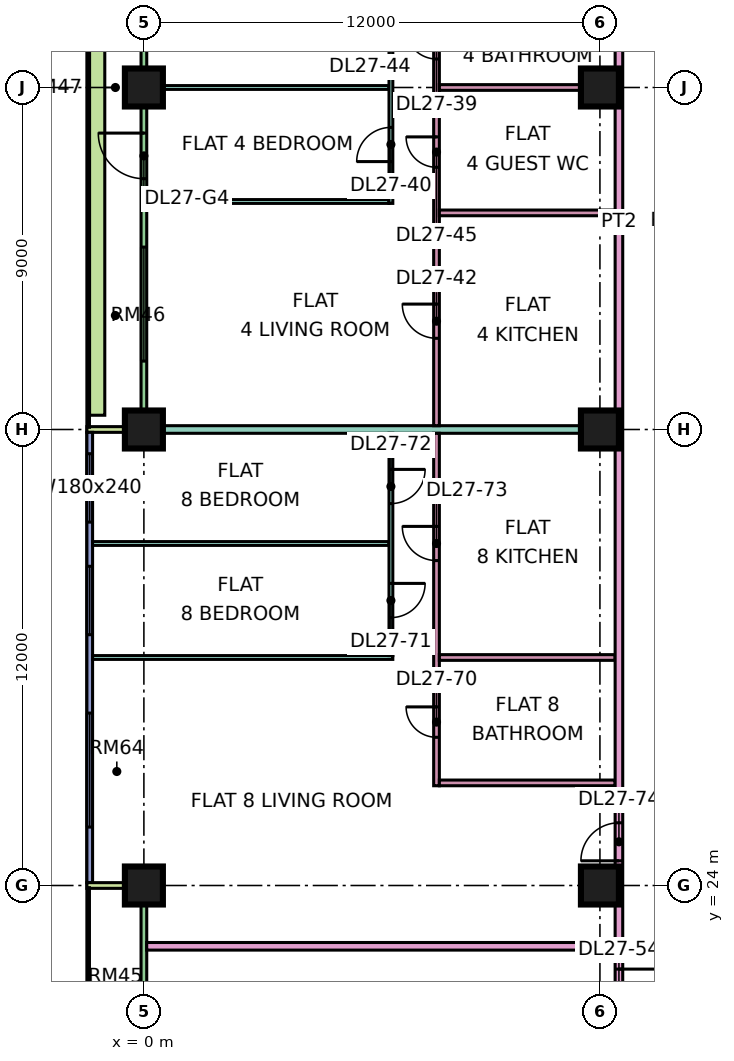
"""IFC4 building model, lengths in metres.
Left out: names, types, materials, properties, quantities, classifications, styles, units other than length and angle.
Written with IfcOpenShell. Run it as: python <this file> out.ifc"""

import sys

from ifc_helpers import new_model, si_unit, direction, frame, frame_2d, origin, origin_2d, place, context, subcontext, project, spatial, rectangle, extrude, element, fill, save


model = new_model("IFC4")
c1 = context("Model", 3, precision=1e-05, world=origin(), true_north=direction((0.0, 1.0)))
c2 = subcontext(c1, "Body", "Model", "MODEL_VIEW")
j1 = project(units=[si_unit("LENGTHUNIT", "METRE"), si_unit("PLANEANGLEUNIT", "RADIAN")], contexts=[c1])
p1 = place(None, origin())
s1 = spatial("IfcSite", under=j1, at=p1, CompositionType="ELEMENT")
p2 = place(p1, origin())
s2 = spatial("IfcBuilding", under=s1, at=p2, CompositionType="ELEMENT")
p3 = place(p2, frame((0.0, 0.0, 118.15)))
s3 = spatial("IfcBuildingStorey", under=s2, at=p3, CompositionType="ELEMENT", Elevation=118.15)
p4 = place(p3, frame((0.0, 24.0, 0.0), z_axis=(0.0, 0.0, 1.0), x_axis=(1.0, 0.0, 0.0)))
e1 = element("IfcColumn", 1, at=p4, inside=s3, PredefinedType="COLUMN", context=c2, shape_type="SweptSolid", body=[
    extrude(rectangle(XDim=1.0, YDim=1.0, at=origin_2d()), origin(), (0.0, 0.0, 1.0), 3.75),
])
p5 = place(p3, frame((0.0, 36.0, 0.0), z_axis=(0.0, 0.0, 1.0), x_axis=(1.0, 0.0, 0.0)))
e2 = element("IfcColumn", 2, at=p5, inside=s3, PredefinedType="COLUMN", context=c2, shape_type="SweptSolid", body=[
    extrude(rectangle(XDim=1.0, YDim=1.0, at=origin_2d()), origin(), (0.0, 0.0, 1.0), 3.75),
])
for number, where, z_axis, x_axis in (
    (3, (0.0, 45.0, 0.0), (0.0, 0.0, 1.0), (1.0, 0.0, 0.0)),
    (4, (12.0, 24.0, 0.0), (0.0, 0.0, 1.0), (1.0, 0.0, 0.0)),
    (5, (12.0, 36.0, 0.0), (0.0, 0.0, 1.0), (1.0, 0.0, 0.0)),
    (6, (12.0, 45.0, 0.0), (0.0, 0.0, 1.0), (1.0, 0.0, 0.0)),
):
    element("IfcColumn", number, at=place(p3, frame(where, z_axis=z_axis, x_axis=x_axis)), inside=s3, PredefinedType="COLUMN", context=c2, shape_type="SweptSolid", body=[
        extrude(rectangle(XDim=1.0, YDim=1.0, at=origin_2d()), origin(), (0.0, 0.0, 1.0), 3.75),
    ])
p6 = place(p3, frame((0.0, 47.925, 0.0), z_axis=(0.0, 0.0, 1.0), x_axis=(0.0, -1.0, 0.0)))
e7 = element("IfcWall", 7, at=p6, inside=s3, PredefinedType="SOLIDWALL", context=c2, shape_type="SweptSolid", body=[
    extrude(rectangle(XDim=11.85, YDim=0.15, at=frame_2d((5.925, 0.0))), origin(), (0.0, 0.0, 1.0), 3.35),
])
p7 = place(p6, frame((0.562, 0.0, 0.45)))
e8 = element("IfcOpeningElement", 8, at=p7, cuts=e7, PredefinedType="OPENING", context=c2, shape_type="SweptSolid", body=[
    extrude(rectangle(XDim=1.2, YDim=2.4, at=frame_2d((0.6, 1.2))), frame((0.0, 0.085, 0.0), z_axis=(0.0, -1.0, 0.0), x_axis=(1.0, 0.0, 0.0)), (0.0, 0.0, 1.0), 0.17),
])
p8 = place(p6, frame((4.125, 0.0, 0.0)))
e9 = element("IfcOpeningElement", 9, at=p8, cuts=e7, PredefinedType="OPENING", context=c2, shape_type="SweptSolid", body=[
    extrude(rectangle(XDim=1.2, YDim=2.4, at=frame_2d((0.6, 1.2))), frame((0.0, 0.085, 0.0), z_axis=(0.0, -1.0, 0.0), x_axis=(1.0, 0.0, 0.0)), (0.0, 0.0, 1.0), 0.17),
])
p9 = place(p6, frame((7.125, 0.0, 0.45)))
e10 = element("IfcOpeningElement", 10, at=p9, cuts=e7, PredefinedType="OPENING", context=c2, shape_type="SweptSolid", body=[
    extrude(rectangle(XDim=3.0, YDim=2.4, at=frame_2d((1.5, 1.2))), frame((0.0, 0.085, 0.0), z_axis=(0.0, -1.0, 0.0), x_axis=(1.0, 0.0, 0.0)), (0.0, 0.0, 1.0), 0.17),
])
p10 = place(p3, frame((-1.5, 36.0, 0.0), z_axis=(0.0, 0.0, 1.0), x_axis=(1.0, 0.0, 0.0)))
e11 = element("IfcWall", 11, at=p10, inside=s3, PredefinedType="SOLIDWALL", context=c2, shape_type="SweptSolid", body=[
    extrude(rectangle(XDim=1.5, YDim=0.15, at=frame_2d((0.75, 0.0))), origin(), (0.0, 0.0, 1.0), 3.35),
])
p11 = place(p3, frame((-1.425, 35.925, 0.0), z_axis=(0.0, 0.0, 1.0), x_axis=(0.0, -1.0, 0.0)))
e12 = element("IfcWall", 12, at=p11, inside=s3, PredefinedType="SOLIDWALL", context=c2, shape_type="SweptSolid", body=[
    extrude(rectangle(XDim=11.85, YDim=0.15, at=frame_2d((5.925, 0.0))), origin(), (0.0, 0.0, 1.0), 3.35),
])
p12 = place(p11, frame((0.562, 0.0, 0.45)))
e13 = element("IfcOpeningElement", 13, at=p12, cuts=e12, PredefinedType="OPENING", context=c2, shape_type="SweptSolid", body=[
    extrude(rectangle(XDim=1.8, YDim=2.4, at=frame_2d((0.9, 1.2))), frame((0.0, 0.085, 0.0), z_axis=(0.0, -1.0, 0.0), x_axis=(1.0, 0.0, 0.0)), (0.0, 0.0, 1.0), 0.17),
])
p13 = place(p11, frame((3.525, 0.0, 0.45)))
e14 = element("IfcOpeningElement", 14, at=p13, cuts=e12, PredefinedType="OPENING", context=c2, shape_type="SweptSolid", body=[
    extrude(rectangle(XDim=1.8, YDim=2.4, at=frame_2d((0.9, 1.2))), frame((0.0, 0.085, 0.0), z_axis=(0.0, -1.0, 0.0), x_axis=(1.0, 0.0, 0.0)), (0.0, 0.0, 1.0), 0.17),
])
p14 = place(p11, frame((7.387, 0.0, 0.45)))
e15 = element("IfcOpeningElement", 15, at=p14, cuts=e12, PredefinedType="OPENING", context=c2, shape_type="SweptSolid", body=[
    extrude(rectangle(XDim=3.0, YDim=2.4, at=frame_2d((1.5, 1.2))), frame((0.0, 0.085, 0.0), z_axis=(0.0, -1.0, 0.0), x_axis=(1.0, 0.0, 0.0)), (0.0, 0.0, 1.0), 0.17),
])
p15 = place(p3, frame((0.0, 23.925, 0.0), z_axis=(0.0, 0.0, 1.0), x_axis=(0.0, -1.0, 0.0)))
e16 = element("IfcWall", 16, at=p15, inside=s3, PredefinedType="SOLIDWALL", context=c2, shape_type="SweptSolid", body=[
    extrude(rectangle(XDim=11.35, YDim=0.15, at=frame_2d((5.675, 0.0))), origin(), (0.0, 0.0, 1.0), 3.35),
])
p16 = place(p15, frame((6.738, 0.0, 0.0)))
e17 = element("IfcOpeningElement", 17, at=p16, cuts=e16, PredefinedType="OPENING", context=c2, shape_type="SweptSolid", body=[
    extrude(rectangle(XDim=1.8, YDim=2.4, at=frame_2d((0.9, 1.2))), frame((0.0, 0.085, 0.0), z_axis=(0.0, -1.0, 0.0), x_axis=(1.0, 0.0, 0.0)), (0.0, 0.0, 1.0), 0.17),
])
p17 = place(p3, frame((-1.5, 24.0, 0.0), z_axis=(0.0, 0.0, 1.0), x_axis=(1.0, 0.0, 0.0)))
e18 = element("IfcWall", 18, at=p17, inside=s3, PredefinedType="SOLIDWALL", context=c2, shape_type="SweptSolid", body=[
    extrude(rectangle(XDim=1.5, YDim=0.15, at=frame_2d((0.75, 0.0))), origin(), (0.0, 0.0, 1.0), 3.35),
])
p18 = place(p3, frame((-1.229, 47.625, 0.0), z_axis=(0.0, 0.0, 1.0), x_axis=(0.0, -1.0, 0.0)))
e19 = element("IfcWall", 19, at=p18, inside=s3, PredefinedType="SOLIDWALL", context=c2, shape_type="SweptSolid", body=[
    extrude(rectangle(XDim=11.25, YDim=0.4, at=frame_2d((5.625, 0.0))), origin(), (0.0, 0.0, 1.0), 0.7),
])
p19 = place(p3, frame((-1.351, 33.0, 0.0), z_axis=(0.0, 0.0, 1.0), x_axis=(1.0, 0.0, 0.0)))
e20 = element("IfcWall", 20, at=p19, inside=s3, PredefinedType="PARTITIONING", context=c2, shape_type="SweptSolid", body=[
    extrude(rectangle(XDim=7.801, YDim=0.1, at=frame_2d((3.9, 0.0))), origin(), (0.0, 0.0, 1.0), 3.35),
])
p20 = place(p3, frame((-1.35, 30.0, 0.0), z_axis=(0.0, 0.0, 1.0), x_axis=(1.0, 0.0, 0.0)))
e21 = element("IfcWall", 21, at=p20, inside=s3, PredefinedType="PARTITIONING", context=c2, shape_type="SweptSolid", body=[
    extrude(rectangle(XDim=7.9, YDim=0.1, at=frame_2d((3.95, 0.0))), origin(), (0.0, 0.0, 1.0), 3.35),
])
e22 = element("IfcWall", 22, at=p5, inside=s3, PredefinedType="PARTITIONING", context=c2, shape_type="SweptSolid", body=[
    extrude(rectangle(XDim=12.4, YDim=0.2, at=frame_2d((6.2, 0.0))), origin(), (0.0, 0.0, 1.0), 3.35),
])
p21 = place(p3, frame((0.074, 22.4, 0.0), z_axis=(0.0, 0.0, 1.0), x_axis=(1.0, 0.0, 0.0)))
e23 = element("IfcWall", 23, at=p21, inside=s3, PredefinedType="PARTITIONING", context=c2, shape_type="SweptSolid", body=[
    extrude(rectangle(XDim=12.326, YDim=0.2, at=frame_2d((6.163, 0.0))), origin(), (0.0, 0.0, 1.0), 3.35),
])
for number, where, z_axis, x_axis in (
    (24, (0.074, 42.0, 0.0), (0.0, 0.0, 1.0), (1.0, 0.0, 0.0)),
    (25, (0.074, 45.0, 0.0), (0.0, 0.0, 1.0), (1.0, 0.0, 0.0)),
):
    element("IfcWall", number, at=place(p3, frame(where, z_axis=z_axis, x_axis=x_axis)), inside=s3, PredefinedType="PARTITIONING", context=c2, shape_type="SweptSolid", body=[
        extrude(rectangle(XDim=6.376, YDim=0.1, at=frame_2d((3.188, 0.0))), origin(), (0.0, 0.0, 1.0), 3.35),
    ])
p22 = place(p3, frame((6.5, 30.05, 0.0), z_axis=(0.0, 0.0, 1.0), x_axis=(0.0, 1.0, 0.0)))
e26 = element("IfcWall", 26, at=p22, inside=s3, PredefinedType="PARTITIONING", context=c2, shape_type="SweptSolid", body=[
    extrude(rectangle(XDim=5.85, YDim=0.1, at=frame_2d((2.925, 0.0))), origin(), (0.0, 0.0, 1.0), 3.35),
])
p23 = place(p22, frame((1.0, 0.0, 0.0)))
e27 = element("IfcOpeningElement", 27, at=p23, cuts=e26, PredefinedType="OPENING", context=c2, shape_type="SweptSolid", body=[
    extrude(rectangle(XDim=0.9, YDim=2.1, at=frame_2d((0.45, 1.05))), frame((0.0, 0.06, 0.0), z_axis=(0.0, -1.0, 0.0), x_axis=(1.0, 0.0, 0.0)), (0.0, 0.0, 1.0), 0.12),
])
p24 = place(p22, frame((4.0, 0.0, 0.0)))
e28 = element("IfcOpeningElement", 28, at=p24, cuts=e26, PredefinedType="OPENING", context=c2, shape_type="SweptSolid", body=[
    extrude(rectangle(XDim=0.9, YDim=2.1, at=frame_2d((0.45, 1.05))), frame((0.0, 0.06, 0.0), z_axis=(0.0, -1.0, 0.0), x_axis=(1.0, 0.0, 0.0)), (0.0, 0.0, 1.0), 0.12),
])
p25 = place(p3, frame((6.5, 41.95, 0.0), z_axis=(0.0, 0.0, 1.0), x_axis=(0.0, 1.0, 0.0)))
e29 = element("IfcWall", 29, at=p25, inside=s3, PredefinedType="PARTITIONING", context=c2, shape_type="SweptSolid", body=[
    extrude(rectangle(XDim=8.95, YDim=0.1, at=frame_2d((4.475, 0.0))), origin(), (0.0, 0.0, 1.0), 3.35),
])
p26 = place(p25, frame((1.1, 0.0, 0.0)))
e30 = element("IfcOpeningElement", 30, at=p26, cuts=e29, PredefinedType="OPENING", context=c2, shape_type="SweptSolid", body=[
    extrude(rectangle(XDim=0.9, YDim=2.1, at=frame_2d((0.45, 1.05))), frame((0.0, 0.06, 0.0), z_axis=(0.0, -1.0, 0.0), x_axis=(1.0, 0.0, 0.0)), (0.0, 0.0, 1.0), 0.12),
])
p27 = place(p25, frame((7.1, 0.0, 0.0)))
e31 = element("IfcOpeningElement", 31, at=p27, cuts=e29, PredefinedType="OPENING", context=c2, shape_type="SweptSolid", body=[
    extrude(rectangle(XDim=0.9, YDim=2.1, at=frame_2d((0.45, 1.05))), frame((0.0, 0.06, 0.0), z_axis=(0.0, -1.0, 0.0), x_axis=(1.0, 0.0, 0.0)), (0.0, 0.0, 1.0), 0.12),
])
p28 = place(p25, frame((4.1, 0.0, 0.0)))
e32 = element("IfcOpeningElement", 32, at=p28, cuts=e29, PredefinedType="OPENING", context=c2, shape_type="SweptSolid", body=[
    extrude(rectangle(XDim=0.9, YDim=2.1, at=frame_2d((0.45, 1.05))), frame((0.0, 0.06, 0.0), z_axis=(0.0, -1.0, 0.0), x_axis=(1.0, 0.0, 0.0)), (0.0, 0.0, 1.0), 0.12),
])
p29 = place(p3, frame((7.7, 26.625, 0.0), z_axis=(0.0, 0.0, 1.0), x_axis=(0.0, 1.0, 0.0)))
e33 = element("IfcWall", 33, at=p29, inside=s3, PredefinedType="PARTITIONING", context=c2, shape_type="SweptSolid", body=[
    extrude(rectangle(XDim=9.275, YDim=0.15, at=frame_2d((4.637, 0.0))), origin(), (0.0, 0.0, 1.0), 3.35),
])
p30 = place(p29, frame((1.275, 0.0, 0.0)))
e34 = element("IfcOpeningElement", 34, at=p30, cuts=e33, PredefinedType="OPENING", context=c2, shape_type="SweptSolid", body=[
    extrude(rectangle(XDim=0.8, YDim=2.1, at=frame_2d((0.4, 1.05))), frame((0.0, 0.085, 0.0), z_axis=(0.0, -1.0, 0.0), x_axis=(1.0, 0.0, 0.0)), (0.0, 0.0, 1.0), 0.17),
])
p31 = place(p29, frame((5.925, 0.0, 0.0)))
e35 = element("IfcOpeningElement", 35, at=p31, cuts=e33, PredefinedType="OPENING", context=c2, shape_type="SweptSolid", body=[
    extrude(rectangle(XDim=0.9, YDim=2.1, at=frame_2d((0.45, 1.05))), frame((0.0, 0.085, 0.0), z_axis=(0.0, -1.0, 0.0), x_axis=(1.0, 0.0, 0.0)), (0.0, 0.0, 1.0), 0.17),
])
p32 = place(p3, frame((7.7, 36.1, 0.0), z_axis=(0.0, 0.0, 1.0), x_axis=(0.0, 1.0, 0.0)))
e36 = element("IfcWall", 36, at=p32, inside=s3, PredefinedType="PARTITIONING", context=c2, shape_type="SweptSolid", body=[
    extrude(rectangle(XDim=11.375, YDim=0.15, at=frame_2d((5.688, 0.0))), origin(), (0.0, 0.0, 1.0), 3.35),
])
p33 = place(p32, frame((9.65, 0.0, 0.0)))
e37 = element("IfcOpeningElement", 37, at=p33, cuts=e36, PredefinedType="OPENING", context=c2, shape_type="SweptSolid", body=[
    extrude(rectangle(XDim=0.8, YDim=2.1, at=frame_2d((0.4, 1.05))), frame((0.0, 0.085, 0.0), z_axis=(0.0, -1.0, 0.0), x_axis=(1.0, 0.0, 0.0)), (0.0, 0.0, 1.0), 0.17),
])
p34 = place(p32, frame((2.3, 0.0, 0.0)))
e38 = element("IfcOpeningElement", 38, at=p34, cuts=e36, PredefinedType="OPENING", context=c2, shape_type="SweptSolid", body=[
    extrude(rectangle(XDim=0.9, YDim=2.1, at=frame_2d((0.45, 1.05))), frame((0.0, 0.085, 0.0), z_axis=(0.0, -1.0, 0.0), x_axis=(1.0, 0.0, 0.0)), (0.0, 0.0, 1.0), 0.17),
])
p35 = place(p32, frame((6.8, 0.0, 0.0)))
e39 = element("IfcOpeningElement", 39, at=p35, cuts=e36, PredefinedType="OPENING", context=c2, shape_type="SweptSolid", body=[
    extrude(rectangle(XDim=0.8, YDim=2.1, at=frame_2d((0.4, 1.05))), frame((0.0, 0.085, 0.0), z_axis=(0.0, -1.0, 0.0), x_axis=(1.0, 0.0, 0.0)), (0.0, 0.0, 1.0), 0.17),
])
for number, where, z_axis, x_axis in (
    (40, (7.775, 26.7, 0.0), (0.0, 0.0, 1.0), (1.0, 0.0, 0.0)),
    (41, (7.775, 30.0, 0.0), (0.0, 0.0, 1.0), (1.0, 0.0, 0.0)),
    (42, (7.775, 41.7, 0.0), (0.0, 0.0, 1.0), (1.0, 0.0, 0.0)),
    (43, (7.775, 45.0, 0.0), (0.0, 0.0, 1.0), (1.0, 0.0, 0.0)),
):
    element("IfcWall", number, at=place(p3, frame(where, z_axis=z_axis, x_axis=x_axis)), inside=s3, PredefinedType="PARTITIONING", context=c2, shape_type="SweptSolid", body=[
        extrude(rectangle(XDim=4.625, YDim=0.15, at=frame_2d((2.312, 0.0))), origin(), (0.0, 0.0, 1.0), 3.35),
    ])
p36 = place(p3, frame((12.5, 20.0, 0.0), z_axis=(0.0, 0.0, 1.0), x_axis=(0.0, 1.0, 0.0)))
e44 = element("IfcWall", 44, at=p36, inside=s3, PredefinedType="PARTITIONING", context=c2, shape_type="SweptSolid", body=[
    extrude(rectangle(XDim=42.926, YDim=0.2, at=frame_2d((21.463, 0.0))), origin(), (0.0, 0.0, 1.0), 3.35),
])
p37 = place(p36, frame((28.65, 0.0, 0.0)))
e45 = element("IfcOpeningElement", 45, at=p37, cuts=e44, PredefinedType="OPENING", context=c2, shape_type="SweptSolid", body=[
    extrude(rectangle(XDim=1.0, YDim=2.1, at=frame_2d((0.5, 1.05))), frame((0.0, 0.11, 0.0), z_axis=(0.0, -1.0, 0.0), x_axis=(1.0, 0.0, 0.0)), (0.0, 0.0, 1.0), 0.22),
])
p38 = place(p36, frame((31.95, 0.0, 0.0)))
e46 = element("IfcOpeningElement", 46, at=p38, cuts=e44, PredefinedType="OPENING", context=c2, shape_type="SweptSolid", body=[
    extrude(rectangle(XDim=1.0, YDim=2.1, at=frame_2d((0.5, 1.05))), frame((0.0, 0.11, 0.0), z_axis=(0.0, -1.0, 0.0), x_axis=(1.0, 0.0, 0.0)), (0.0, 0.0, 1.0), 0.22),
])
p39 = place(p36, frame((0.6, 0.0, 0.0)))
e47 = element("IfcOpeningElement", 47, at=p39, cuts=e44, PredefinedType="OPENING", context=c2, shape_type="SweptSolid", body=[
    extrude(rectangle(XDim=1.2, YDim=2.1, at=frame_2d((0.6, 1.05))), frame((0.0, 0.11, 0.0), z_axis=(0.0, -1.0, 0.0), x_axis=(1.0, 0.0, 0.0)), (0.0, 0.0, 1.0), 0.22),
])
p40 = place(p36, frame((4.65, 0.0, 0.0)))
e48 = element("IfcOpeningElement", 48, at=p40, cuts=e44, PredefinedType="OPENING", context=c2, shape_type="SweptSolid", body=[
    extrude(rectangle(XDim=1.0, YDim=2.1, at=frame_2d((0.5, 1.05))), frame((0.0, 0.11, 0.0), z_axis=(0.0, -1.0, 0.0), x_axis=(1.0, 0.0, 0.0)), (0.0, 0.0, 1.0), 0.22),
])
p41 = place(p8, frame((1.2, 0.0, 0.0), z_axis=(0.0, 0.0, 1.0), x_axis=(-1.0, 0.0, 0.0)))
e49 = element("IfcDoor", 49, at=p41, inside=s3, OperationType="DOUBLE_DOOR_SINGLE_SWING", PredefinedType="DOOR", context=c2, shape_type="SweptSolid", body=[
    extrude(rectangle(XDim=1.2, YDim=2.4, at=frame_2d((0.6, 1.2))), frame((0.0, 0.025, 0.0), z_axis=(0.0, -1.0, 0.0), x_axis=(1.0, 0.0, 0.0)), (0.0, 0.0, 1.0), 0.05),
])
fill(e9, e49)
p42 = place(p9, origin())
e50 = element("IfcWindow", 50, at=p42, inside=s3, PartitioningType="SINGLE_PANEL", PredefinedType="WINDOW", context=c2, shape_type="SweptSolid", body=[
    extrude(rectangle(XDim=3.0, YDim=2.4, at=frame_2d((1.5, 1.2))), frame((0.0, 0.03, 0.0), z_axis=(0.0, -1.0, 0.0), x_axis=(1.0, 0.0, 0.0)), (0.0, 0.0, 1.0), 0.06),
])
fill(e10, e50)
p43 = place(p12, origin())
e51 = element("IfcWindow", 51, at=p43, inside=s3, PartitioningType="SINGLE_PANEL", PredefinedType="WINDOW", context=c2, shape_type="SweptSolid", body=[
    extrude(rectangle(XDim=1.8, YDim=2.4, at=frame_2d((0.9, 1.2))), frame((0.0, 0.03, 0.0), z_axis=(0.0, -1.0, 0.0), x_axis=(1.0, 0.0, 0.0)), (0.0, 0.0, 1.0), 0.06),
])
fill(e13, e51)
p44 = place(p13, origin())
e52 = element("IfcWindow", 52, at=p44, inside=s3, PartitioningType="SINGLE_PANEL", PredefinedType="WINDOW", context=c2, shape_type="SweptSolid", body=[
    extrude(rectangle(XDim=1.8, YDim=2.4, at=frame_2d((0.9, 1.2))), frame((0.0, 0.03, 0.0), z_axis=(0.0, -1.0, 0.0), x_axis=(1.0, 0.0, 0.0)), (0.0, 0.0, 1.0), 0.06),
])
fill(e14, e52)
p45 = place(p14, origin())
e53 = element("IfcWindow", 53, at=p45, inside=s3, PartitioningType="SINGLE_PANEL", PredefinedType="WINDOW", context=c2, shape_type="SweptSolid", body=[
    extrude(rectangle(XDim=3.0, YDim=2.4, at=frame_2d((1.5, 1.2))), frame((0.0, 0.03, 0.0), z_axis=(0.0, -1.0, 0.0), x_axis=(1.0, 0.0, 0.0)), (0.0, 0.0, 1.0), 0.06),
])
fill(e15, e53)
p46 = place(p33, frame((0.8, 0.0, 0.0), z_axis=(0.0, 0.0, 1.0), x_axis=(-1.0, 0.0, 0.0)))
e54 = element("IfcDoor", 54, at=p46, inside=s3, OperationType="SINGLE_SWING_RIGHT", PredefinedType="DOOR", context=c2, shape_type="SweptSolid", body=[
    extrude(rectangle(XDim=0.8, YDim=2.1, at=frame_2d((0.4, 1.05))), frame((0.0, 0.025, 0.0), z_axis=(0.0, -1.0, 0.0), x_axis=(1.0, 0.0, 0.0)), (0.0, 0.0, 1.0), 0.05),
])
fill(e37, e54)
p47 = place(p26, origin())
e55 = element("IfcDoor", 55, at=p47, inside=s3, OperationType="SINGLE_SWING_LEFT", PredefinedType="DOOR", context=c2, shape_type="SweptSolid", body=[
    extrude(rectangle(XDim=0.9, YDim=2.1, at=frame_2d((0.45, 1.05))), frame((0.0, 0.025, 0.0), z_axis=(0.0, -1.0, 0.0), x_axis=(1.0, 0.0, 0.0)), (0.0, 0.0, 1.0), 0.05),
])
fill(e30, e55)
p48 = place(p34, frame((0.9, 0.0, 0.0), z_axis=(0.0, 0.0, 1.0), x_axis=(-1.0, 0.0, 0.0)))
e56 = element("IfcDoor", 56, at=p48, inside=s3, OperationType="SINGLE_SWING_RIGHT", PredefinedType="DOOR", context=c2, shape_type="SweptSolid", body=[
    extrude(rectangle(XDim=0.9, YDim=2.1, at=frame_2d((0.45, 1.05))), frame((0.0, 0.025, 0.0), z_axis=(0.0, -1.0, 0.0), x_axis=(1.0, 0.0, 0.0)), (0.0, 0.0, 1.0), 0.05),
])
fill(e38, e56)
p49 = place(p35, frame((0.8, 0.0, 0.0), z_axis=(0.0, 0.0, 1.0), x_axis=(-1.0, 0.0, 0.0)))
e57 = element("IfcDoor", 57, at=p49, inside=s3, OperationType="SINGLE_SWING_RIGHT", PredefinedType="DOOR", context=c2, shape_type="SweptSolid", body=[
    extrude(rectangle(XDim=0.8, YDim=2.1, at=frame_2d((0.4, 1.05))), frame((0.0, 0.025, 0.0), z_axis=(0.0, -1.0, 0.0), x_axis=(1.0, 0.0, 0.0)), (0.0, 0.0, 1.0), 0.05),
])
fill(e39, e57)
p50 = place(p39, origin())
e58 = element("IfcDoor", 58, at=p50, inside=s3, OperationType="SINGLE_SWING_RIGHT", PredefinedType="DOOR", context=c2, shape_type="SweptSolid", body=[
    extrude(rectangle(XDim=1.2, YDim=2.1, at=frame_2d((0.6, 1.05))), frame((0.0, 0.025, 0.0), z_axis=(0.0, -1.0, 0.0), x_axis=(1.0, 0.0, 0.0)), (0.0, 0.0, 1.0), 0.05),
])
fill(e47, e58)
p51 = place(p30, frame((0.8, 0.0, 0.0), z_axis=(0.0, 0.0, 1.0), x_axis=(-1.0, 0.0, 0.0)))
e59 = element("IfcDoor", 59, at=p51, inside=s3, OperationType="SINGLE_SWING_RIGHT", PredefinedType="DOOR", context=c2, shape_type="SweptSolid", body=[
    extrude(rectangle(XDim=0.8, YDim=2.1, at=frame_2d((0.4, 1.05))), frame((0.0, 0.025, 0.0), z_axis=(0.0, -1.0, 0.0), x_axis=(1.0, 0.0, 0.0)), (0.0, 0.0, 1.0), 0.05),
])
fill(e34, e59)
p52 = place(p23, origin())
e60 = element("IfcDoor", 60, at=p52, inside=s3, OperationType="SINGLE_SWING_RIGHT", PredefinedType="DOOR", context=c2, shape_type="SweptSolid", body=[
    extrude(rectangle(XDim=0.9, YDim=2.1, at=frame_2d((0.45, 1.05))), frame((0.0, 0.025, 0.0), z_axis=(0.0, -1.0, 0.0), x_axis=(1.0, 0.0, 0.0)), (0.0, 0.0, 1.0), 0.05),
])
fill(e27, e60)
p53 = place(p24, origin())
e61 = element("IfcDoor", 61, at=p53, inside=s3, OperationType="SINGLE_SWING_RIGHT", PredefinedType="DOOR", context=c2, shape_type="SweptSolid", body=[
    extrude(rectangle(XDim=0.9, YDim=2.1, at=frame_2d((0.45, 1.05))), frame((0.0, 0.025, 0.0), z_axis=(0.0, -1.0, 0.0), x_axis=(1.0, 0.0, 0.0)), (0.0, 0.0, 1.0), 0.05),
])
fill(e28, e61)
p54 = place(p31, frame((0.9, 0.0, 0.0), z_axis=(0.0, 0.0, 1.0), x_axis=(-1.0, 0.0, 0.0)))
e62 = element("IfcDoor", 62, at=p54, inside=s3, OperationType="SINGLE_SWING_RIGHT", PredefinedType="DOOR", context=c2, shape_type="SweptSolid", body=[
    extrude(rectangle(XDim=0.9, YDim=2.1, at=frame_2d((0.45, 1.05))), frame((0.0, 0.025, 0.0), z_axis=(0.0, -1.0, 0.0), x_axis=(1.0, 0.0, 0.0)), (0.0, 0.0, 1.0), 0.05),
])
fill(e35, e62)
p55 = place(p40, origin())
e63 = element("IfcDoor", 63, at=p55, inside=s3, OperationType="SINGLE_SWING_LEFT", PredefinedType="DOOR", context=c2, shape_type="SweptSolid", body=[
    extrude(rectangle(XDim=1.0, YDim=2.1, at=frame_2d((0.5, 1.05))), frame((0.0, 0.025, 0.0), z_axis=(0.0, -1.0, 0.0), x_axis=(1.0, 0.0, 0.0)), (0.0, 0.0, 1.0), 0.05),
])
fill(e48, e63)
save(model, sys.argv[1])
